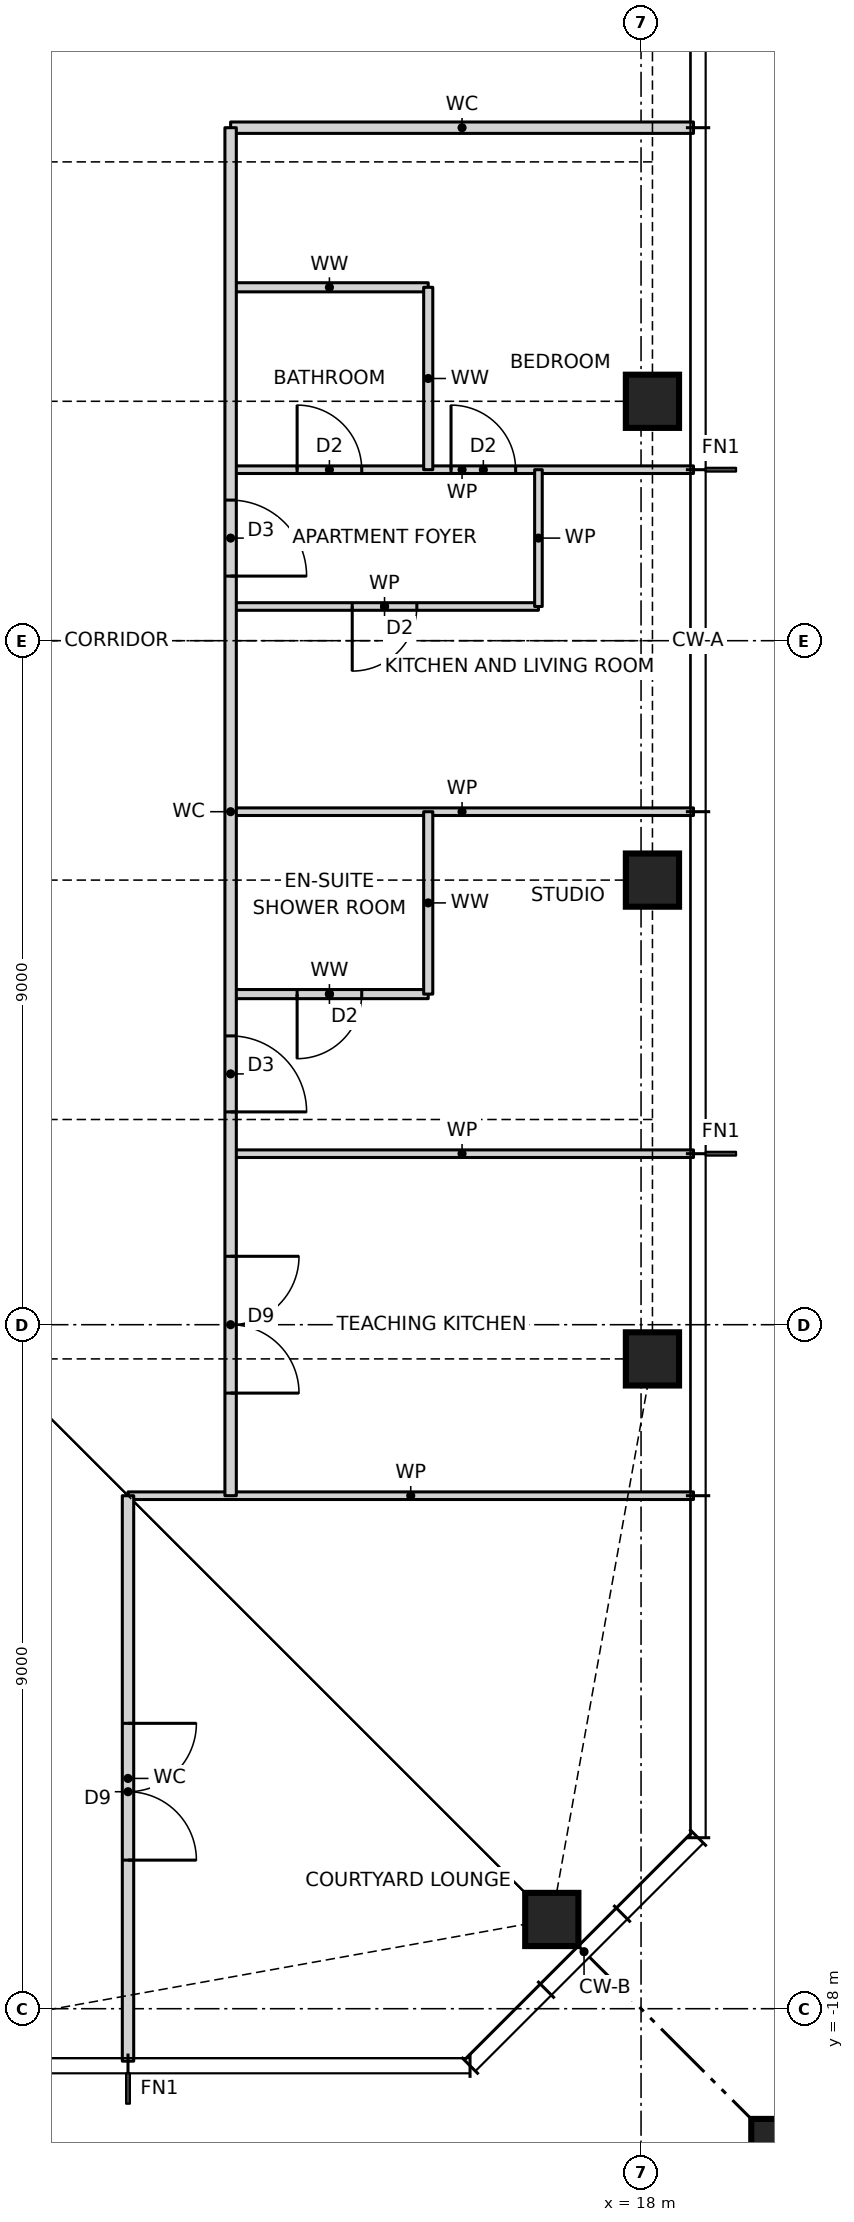
"""IFC4 building model, lengths in metres.
Left out: names, types, materials, properties, quantities, classifications, styles, units other than length and angle.
Written with IfcOpenShell. Run it as: python <this file> out.ifc"""

import sys

from ifc_helpers import new_model, si_unit, direction, frame, frame_2d, origin, origin_2d, place, context, subcontext, project, spatial, rectangle, hollow_rectangle, i_section, extrude, element, fill, save


model = new_model("IFC4")
c1 = context("Model", 3, precision=1e-05, world=origin(), true_north=direction((0.0, 1.0)))
c2 = subcontext(c1, "Body", "Model", "MODEL_VIEW")
j1 = project(units=[si_unit("LENGTHUNIT", "METRE"), si_unit("PLANEANGLEUNIT", "RADIAN")], contexts=[c1])
p1 = place(None, origin())
s1 = spatial("IfcSite", under=j1, at=p1, CompositionType="ELEMENT")
p2 = place(p1, origin())
s2 = spatial("IfcBuilding", under=s1, at=p2, CompositionType="ELEMENT")
p3 = place(p2, frame((0.0, 0.0, 202.0)))
s3 = spatial("IfcBuildingStorey", under=s2, at=p3, CompositionType="ELEMENT", Elevation=202.0)
for number, where, z_axis, x_axis in (
    (1, (16.826, -16.826, 0.0), (0.0, 0.0, 1.0), (1.0, 0.0, 0.0)),
    (2, (18.15, -9.45, 0.0), (0.0, 0.0, 1.0), (1.0, 0.0, 0.0)),
    (3, (18.15, -3.15, 0.0), (0.0, 0.0, 1.0), (1.0, 0.0, 0.0)),
    (4, (18.15, 3.15, 0.0), (0.0, 0.0, 1.0), (1.0, 0.0, 0.0)),
):
    element("IfcColumn", number, at=place(p3, frame(where, z_axis=z_axis, x_axis=x_axis)), inside=s3, PredefinedType="COLUMN", context=c2, shape_type="SweptSolid", body=[
        extrude(hollow_rectangle(XDim=0.7, YDim=0.7, WallThickness=0.06, at=origin_2d()), origin(), (0.0, 0.0, 1.0), 3.5),
    ])
p4 = place(p3, frame((21.65, -21.65, 0.0), z_axis=(0.0, 0.0, 1.0), x_axis=(1.0, 0.0, 0.0)))
e5 = element("IfcColumn", 5, at=p4, inside=s3, PredefinedType="COLUMN", context=c2, shape_type="SweptSolid", body=[
    extrude(rectangle(XDim=4.4, YDim=4.4, at=origin_2d()), origin(), (0.0, 0.0, 1.0), 3.5),
    extrude(i_section(OverallWidth=0.478, OverallDepth=0.599, WebThickness=0.1, FlangeThickness=0.14, at=origin_2d()), origin(), (0.0, 0.0, 1.0), 3.5),
])
p5 = place(p3, frame((11.25, -11.25, 0.0), z_axis=(0.0, 0.0, 1.0), x_axis=(1.0, 0.0, 0.0)))
e6 = element("IfcWall", 6, at=p5, inside=s3, PredefinedType="PARTITIONING", context=c2, shape_type="SweptSolid", body=[
    extrude(rectangle(XDim=7.44, YDim=0.1, at=frame_2d((3.72, 0.0))), origin(), (0.0, 0.0, 1.0), 3.27),
])
p6 = place(p3, frame((12.6, -6.75, 0.0), z_axis=(0.0, 0.0, 1.0), x_axis=(1.0, 0.0, 0.0)))
e7 = element("IfcWall", 7, at=p6, inside=s3, PredefinedType="PARTITIONING", context=c2, shape_type="SweptSolid", body=[
    extrude(rectangle(XDim=6.09, YDim=0.1, at=frame_2d((3.045, 0.0))), origin(), (0.0, 0.0, 1.0), 3.27),
])
p7 = place(p3, frame((12.6, -4.65, 0.0), z_axis=(0.0, 0.0, 1.0), x_axis=(1.0, 0.0, 0.0)))
e8 = element("IfcWall", 8, at=p7, inside=s3, PredefinedType="PARTITIONING", context=c2, shape_type="SweptSolid", body=[
    extrude(rectangle(XDim=2.6, YDim=0.12, at=frame_2d((1.3, 0.0))), origin(), (0.0, 0.0, 1.0), 3.27),
])
p8 = place(p7, frame((0.875, 0.0, 0.0)))
e9 = element("IfcOpeningElement", 9, at=p8, cuts=e8, PredefinedType="OPENING", context=c2, shape_type="SweptSolid", body=[
    extrude(rectangle(XDim=0.85, YDim=2.1, at=frame_2d((0.425, 1.05))), frame((0.0, 0.07, 0.0), z_axis=(0.0, -1.0, 0.0), x_axis=(1.0, 0.0, 0.0)), (0.0, 0.0, 1.0), 0.14),
])
p9 = place(p3, frame((12.6, -2.25, 0.0), z_axis=(0.0, 0.0, 1.0), x_axis=(1.0, 0.0, 0.0)))
e10 = element("IfcWall", 10, at=p9, inside=s3, PredefinedType="PARTITIONING", context=c2, shape_type="SweptSolid", body=[
    extrude(rectangle(XDim=6.09, YDim=0.1, at=frame_2d((3.045, 0.0))), origin(), (0.0, 0.0, 1.0), 3.27),
])
p10 = place(p3, frame((12.6, 0.45, 0.0), z_axis=(0.0, 0.0, 1.0), x_axis=(1.0, 0.0, 0.0)))
e11 = element("IfcWall", 11, at=p10, inside=s3, PredefinedType="PARTITIONING", context=c2, shape_type="SweptSolid", body=[
    extrude(rectangle(XDim=4.05, YDim=0.1, at=frame_2d((2.025, 0.0))), origin(), (0.0, 0.0, 1.0), 3.27),
])
p11 = place(p10, frame((1.6, 0.0, 0.0)))
e12 = element("IfcOpeningElement", 12, at=p11, cuts=e11, PredefinedType="OPENING", context=c2, shape_type="SweptSolid", body=[
    extrude(rectangle(XDim=0.85, YDim=2.1, at=frame_2d((0.425, 1.05))), frame((0.0, 0.06, 0.0), z_axis=(0.0, -1.0, 0.0), x_axis=(1.0, 0.0, 0.0)), (0.0, 0.0, 1.0), 0.12),
])
p12 = place(p3, frame((12.6, 2.25, 0.0), z_axis=(0.0, 0.0, 1.0), x_axis=(1.0, 0.0, 0.0)))
e13 = element("IfcWall", 13, at=p12, inside=s3, PredefinedType="PARTITIONING", context=c2, shape_type="SweptSolid", body=[
    extrude(rectangle(XDim=6.09, YDim=0.1, at=frame_2d((3.045, 0.0))), origin(), (0.0, 0.0, 1.0), 3.27),
])
p13 = place(p12, frame((2.9, 0.0, 0.0)))
e14 = element("IfcOpeningElement", 14, at=p13, cuts=e13, PredefinedType="OPENING", context=c2, shape_type="SweptSolid", body=[
    extrude(rectangle(XDim=0.85, YDim=2.1, at=frame_2d((0.425, 1.05))), frame((0.0, 0.06, 0.0), z_axis=(0.0, -1.0, 0.0), x_axis=(1.0, 0.0, 0.0)), (0.0, 0.0, 1.0), 0.12),
])
p14 = place(p12, frame((0.875, 0.0, 0.0)))
e15 = element("IfcOpeningElement", 15, at=p14, cuts=e13, PredefinedType="OPENING", context=c2, shape_type="SweptSolid", body=[
    extrude(rectangle(XDim=0.85, YDim=2.1, at=frame_2d((0.425, 1.05))), frame((0.0, 0.06, 0.0), z_axis=(0.0, -1.0, 0.0), x_axis=(1.0, 0.0, 0.0)), (0.0, 0.0, 1.0), 0.12),
])
p15 = place(p3, frame((12.6, 4.65, 0.0), z_axis=(0.0, 0.0, 1.0), x_axis=(1.0, 0.0, 0.0)))
e16 = element("IfcWall", 16, at=p15, inside=s3, PredefinedType="PARTITIONING", context=c2, shape_type="SweptSolid", body=[
    extrude(rectangle(XDim=2.6, YDim=0.12, at=frame_2d((1.3, 0.0))), origin(), (0.0, 0.0, 1.0), 3.27),
])
p16 = place(p3, frame((12.6, 6.75, 0.0), z_axis=(0.0, 0.0, 1.0), x_axis=(1.0, 0.0, 0.0)))
e17 = element("IfcWall", 17, at=p16, inside=s3, PredefinedType="PARTITIONING", context=c2, shape_type="SweptSolid", body=[
    extrude(rectangle(XDim=6.09, YDim=0.15, at=frame_2d((3.045, 0.0))), origin(), (0.0, 0.0, 1.0), 3.27),
])
p17 = place(p3, frame((16.65, 0.45, 0.0), z_axis=(0.0, 0.0, 1.0), x_axis=(0.0, 1.0, 0.0)))
e18 = element("IfcWall", 18, at=p17, inside=s3, PredefinedType="PARTITIONING", context=c2, shape_type="SweptSolid", body=[
    extrude(rectangle(XDim=1.8, YDim=0.1, at=frame_2d((0.9, 0.0))), origin(), (0.0, 0.0, 1.0), 3.27),
])
for number, where, z_axis, x_axis in (
    (19, (15.2, -4.65, 0.0), (0.0, 0.0, 1.0), (0.0, 1.0, 0.0)),
    (20, (15.2, 2.25, 0.0), (0.0, 0.0, 1.0), (0.0, 1.0, 0.0)),
):
    element("IfcWall", number, at=place(p3, frame(where, z_axis=z_axis, x_axis=x_axis)), inside=s3, PredefinedType="PARTITIONING", context=c2, shape_type="SweptSolid", body=[
        extrude(rectangle(XDim=2.4, YDim=0.12, at=frame_2d((1.2, 0.0))), origin(), (0.0, 0.0, 1.0), 3.27),
    ])
p18 = place(p3, frame((12.6, -11.25, 0.0), z_axis=(0.0, 0.0, 1.0), x_axis=(0.0, 1.0, 0.0)))
e21 = element("IfcWall", 21, at=p18, inside=s3, PredefinedType="PARTITIONING", context=c2, shape_type="SweptSolid", body=[
    extrude(rectangle(XDim=18.0, YDim=0.15, at=frame_2d((9.0, 0.0))), origin(), (0.0, 0.0, 1.0), 3.27),
])
p19 = place(p18, frame((1.35, 0.0, 0.0)))
e22 = element("IfcOpeningElement", 22, at=p19, cuts=e21, PredefinedType="OPENING", context=c2, shape_type="SweptSolid", body=[
    extrude(rectangle(XDim=1.8, YDim=2.1, at=frame_2d((0.9, 1.05))), frame((0.0, 0.085, 0.0), z_axis=(0.0, -1.0, 0.0), x_axis=(1.0, 0.0, 0.0)), (0.0, 0.0, 1.0), 0.17),
])
p20 = place(p18, frame((5.05, 0.0, 0.0)))
e23 = element("IfcOpeningElement", 23, at=p20, cuts=e21, PredefinedType="OPENING", context=c2, shape_type="SweptSolid", body=[
    extrude(rectangle(XDim=1.0, YDim=2.1, at=frame_2d((0.5, 1.05))), frame((0.0, 0.085, 0.0), z_axis=(0.0, -1.0, 0.0), x_axis=(1.0, 0.0, 0.0)), (0.0, 0.0, 1.0), 0.17),
])
p21 = place(p18, frame((12.1, 0.0, 0.0)))
e24 = element("IfcOpeningElement", 24, at=p21, cuts=e21, PredefinedType="OPENING", context=c2, shape_type="SweptSolid", body=[
    extrude(rectangle(XDim=1.0, YDim=2.1, at=frame_2d((0.5, 1.05))), frame((0.0, 0.085, 0.0), z_axis=(0.0, -1.0, 0.0), x_axis=(1.0, 0.0, 0.0)), (0.0, 0.0, 1.0), 0.17),
])
p22 = place(p3, frame((11.25, -18.69, 0.0), z_axis=(0.0, 0.0, 1.0), x_axis=(0.0, 1.0, 0.0)))
e25 = element("IfcWall", 25, at=p22, inside=s3, PredefinedType="PARTITIONING", context=c2, shape_type="SweptSolid", body=[
    extrude(rectangle(XDim=7.44, YDim=0.15, at=frame_2d((3.72, 0.0))), origin(), (0.0, 0.0, 1.0), 3.27),
])
p23 = place(p22, frame((2.645, 0.0, 0.0)))
e26 = element("IfcOpeningElement", 26, at=p23, cuts=e25, PredefinedType="OPENING", context=c2, shape_type="SweptSolid", body=[
    extrude(rectangle(XDim=1.8, YDim=2.1, at=frame_2d((0.9, 1.05))), frame((0.0, 0.085, 0.0), z_axis=(0.0, -1.0, 0.0), x_axis=(1.0, 0.0, 0.0)), (0.0, 0.0, 1.0), 0.17),
])
p24 = place(p19, frame((1.8, 0.0, 0.0), z_axis=(0.0, 0.0, 1.0), x_axis=(-1.0, 0.0, 0.0)))
e27 = element("IfcDoor", 27, at=p24, inside=s3, OperationType="DOUBLE_DOOR_SINGLE_SWING", PredefinedType="DOOR", context=c2, shape_type="SweptSolid", body=[
    extrude(rectangle(XDim=1.8, YDim=2.1, at=frame_2d((0.9, 1.05))), frame((0.0, 0.025, 0.0), z_axis=(0.0, -1.0, 0.0), x_axis=(1.0, 0.0, 0.0)), (0.0, 0.0, 1.0), 0.05),
])
fill(e22, e27)
p25 = place(p20, frame((1.0, 0.0, 0.0), z_axis=(0.0, 0.0, 1.0), x_axis=(-1.0, 0.0, 0.0)))
e28 = element("IfcDoor", 28, at=p25, inside=s3, OperationType="SINGLE_SWING_RIGHT", PredefinedType="DOOR", context=c2, shape_type="SweptSolid", body=[
    extrude(rectangle(XDim=1.0, YDim=2.1, at=frame_2d((0.5, 1.05))), frame((0.0, 0.025, 0.0), z_axis=(0.0, -1.0, 0.0), x_axis=(1.0, 0.0, 0.0)), (0.0, 0.0, 1.0), 0.05),
])
fill(e23, e28)
p26 = place(p8, frame((0.85, 0.0, 0.0), z_axis=(0.0, 0.0, 1.0), x_axis=(-1.0, 0.0, 0.0)))
e29 = element("IfcDoor", 29, at=p26, inside=s3, OperationType="SINGLE_SWING_RIGHT", PredefinedType="DOOR", context=c2, shape_type="SweptSolid", body=[
    extrude(rectangle(XDim=0.85, YDim=2.1, at=frame_2d((0.425, 1.05))), frame((0.0, 0.025, 0.0), z_axis=(0.0, -1.0, 0.0), x_axis=(1.0, 0.0, 0.0)), (0.0, 0.0, 1.0), 0.05),
])
fill(e9, e29)
p27 = place(p21, frame((1.0, 0.0, 0.0), z_axis=(0.0, 0.0, 1.0), x_axis=(-1.0, 0.0, 0.0)))
e30 = element("IfcDoor", 30, at=p27, inside=s3, OperationType="SINGLE_SWING_RIGHT", PredefinedType="DOOR", context=c2, shape_type="SweptSolid", body=[
    extrude(rectangle(XDim=1.0, YDim=2.1, at=frame_2d((0.5, 1.05))), frame((0.0, 0.025, 0.0), z_axis=(0.0, -1.0, 0.0), x_axis=(1.0, 0.0, 0.0)), (0.0, 0.0, 1.0), 0.05),
])
fill(e24, e30)
p28 = place(p11, frame((0.85, 0.0, 0.0), z_axis=(0.0, 0.0, 1.0), x_axis=(-1.0, 0.0, 0.0)))
e31 = element("IfcDoor", 31, at=p28, inside=s3, OperationType="SINGLE_SWING_RIGHT", PredefinedType="DOOR", context=c2, shape_type="SweptSolid", body=[
    extrude(rectangle(XDim=0.85, YDim=2.1, at=frame_2d((0.425, 1.05))), frame((0.0, 0.025, 0.0), z_axis=(0.0, -1.0, 0.0), x_axis=(1.0, 0.0, 0.0)), (0.0, 0.0, 1.0), 0.05),
])
fill(e12, e31)
p29 = place(p13, origin())
e32 = element("IfcDoor", 32, at=p29, inside=s3, OperationType="SINGLE_SWING_LEFT", PredefinedType="DOOR", context=c2, shape_type="SweptSolid", body=[
    extrude(rectangle(XDim=0.85, YDim=2.1, at=frame_2d((0.425, 1.05))), frame((0.0, 0.025, 0.0), z_axis=(0.0, -1.0, 0.0), x_axis=(1.0, 0.0, 0.0)), (0.0, 0.0, 1.0), 0.05),
])
fill(e14, e32)
p30 = place(p14, origin())
e33 = element("IfcDoor", 33, at=p30, inside=s3, OperationType="SINGLE_SWING_LEFT", PredefinedType="DOOR", context=c2, shape_type="SweptSolid", body=[
    extrude(rectangle(XDim=0.85, YDim=2.1, at=frame_2d((0.425, 1.05))), frame((0.0, 0.025, 0.0), z_axis=(0.0, -1.0, 0.0), x_axis=(1.0, 0.0, 0.0)), (0.0, 0.0, 1.0), 0.05),
])
fill(e15, e33)
p31 = place(p23, frame((1.8, 0.0, 0.0), z_axis=(0.0, 0.0, 1.0), x_axis=(-1.0, 0.0, 0.0)))
e34 = element("IfcDoor", 34, at=p31, inside=s3, OperationType="DOUBLE_DOOR_SINGLE_SWING", PredefinedType="DOOR", context=c2, shape_type="SweptSolid", body=[
    extrude(rectangle(XDim=1.8, YDim=2.1, at=frame_2d((0.9, 1.05))), frame((0.0, 0.025, 0.0), z_axis=(0.0, -1.0, 0.0), x_axis=(1.0, 0.0, 0.0)), (0.0, 0.0, 1.0), 0.05),
])
fill(e26, e34)
save(model, sys.argv[1])
